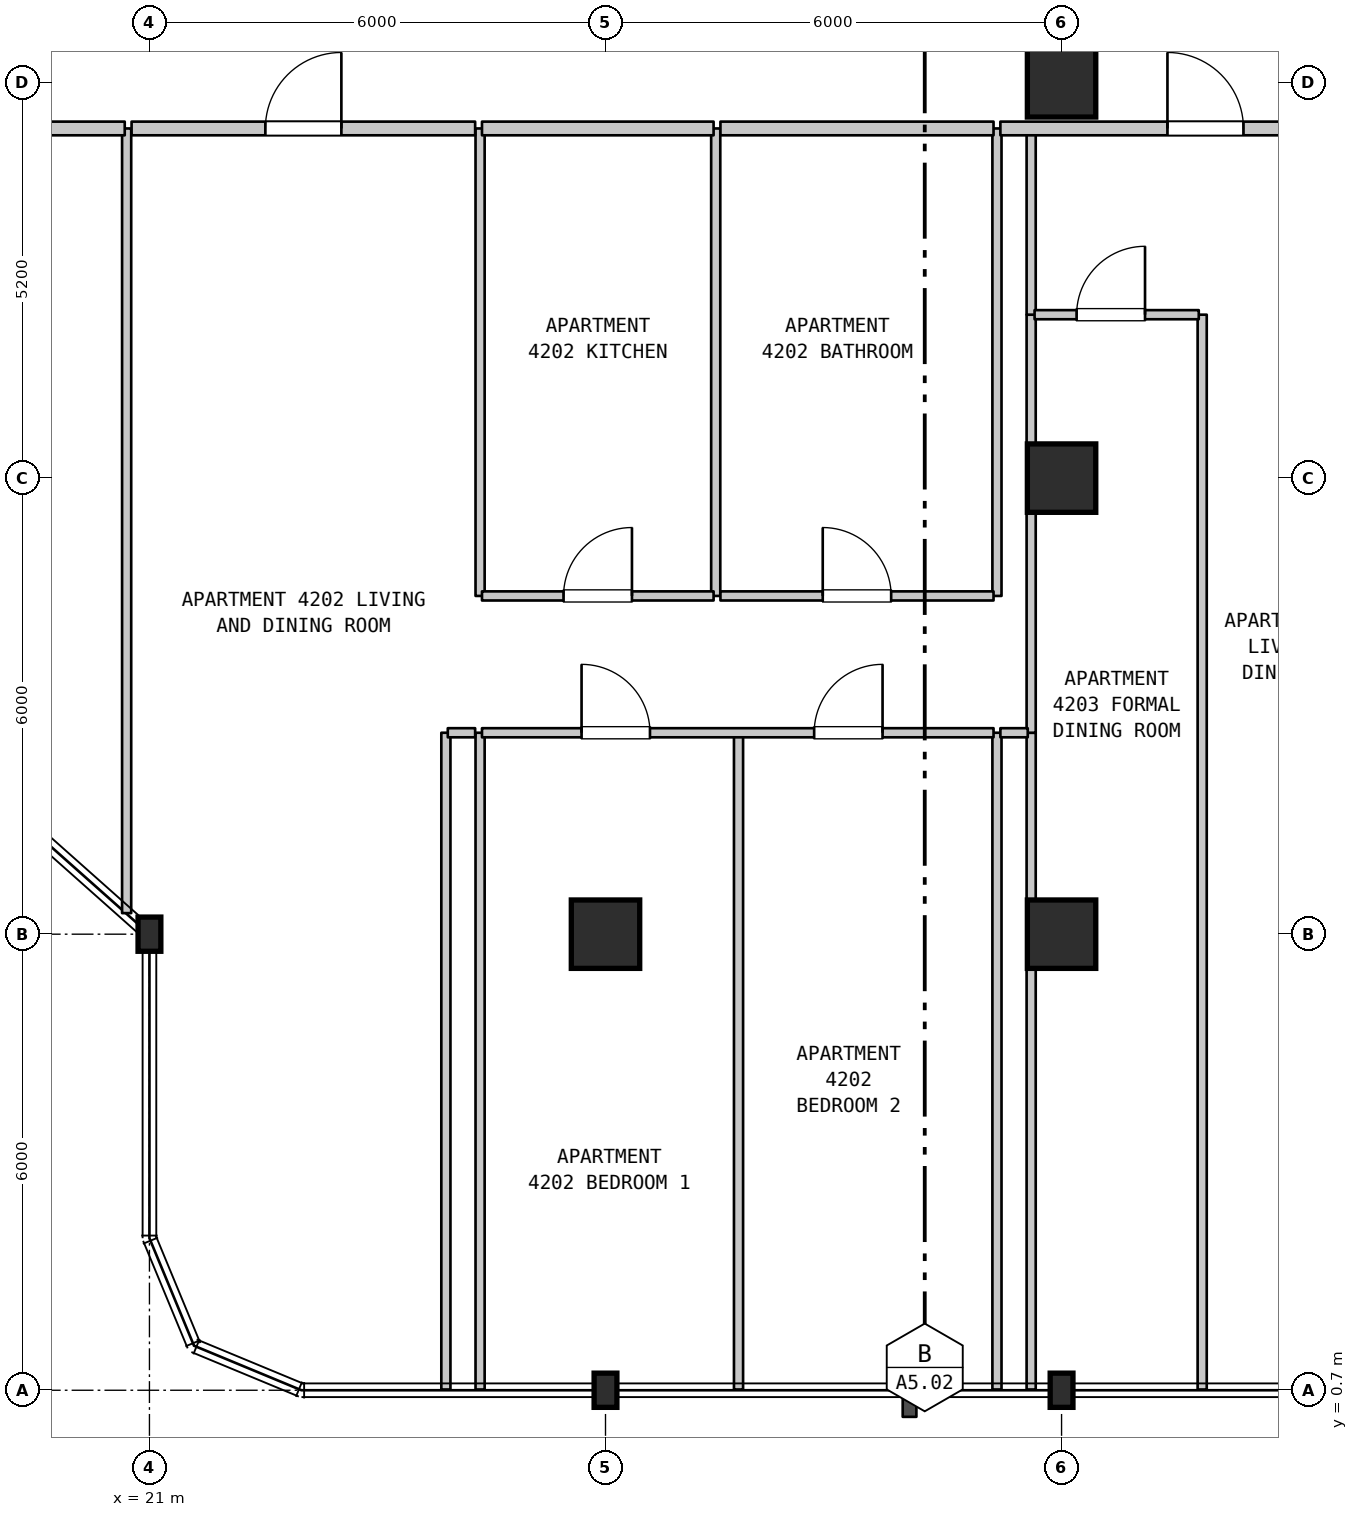
"""IFC4 building model, lengths in metres.
Left out: names, types, materials, properties, quantities, classifications, styles, units other than length and angle.
Written with IfcOpenShell. Run it as: python <this file> out.ifc"""

import sys

from ifc_helpers import new_model, si_unit, direction, frame, frame_2d, origin, origin_2d, place, context, subcontext, project, spatial, rectangle, i_section, extrude, element, fill, save


model = new_model("IFC4")
c1 = context("Model", 3, precision=1e-05, world=origin(), true_north=direction((0.0, 1.0)))
c2 = subcontext(c1, "Body", "Model", "MODEL_VIEW")
j1 = project(units=[si_unit("LENGTHUNIT", "METRE"), si_unit("PLANEANGLEUNIT", "RADIAN")], contexts=[c1])
p1 = place(None, origin())
s1 = spatial("IfcSite", under=j1, at=p1, CompositionType="ELEMENT")
p2 = place(p1, origin())
s2 = spatial("IfcBuilding", under=s1, at=p2, CompositionType="ELEMENT")
p3 = place(p2, frame((0.0, 0.0, 172.8)))
s3 = spatial("IfcBuildingStorey", under=s2, at=p3, CompositionType="ELEMENT", Elevation=172.8)
for number, where, z_axis, x_axis in (
    (1, (21.0, 6.7, 0.0), (0.0, 0.0, 1.0), (1.0, 0.0, 0.0)),
    (2, (27.0, 0.7, 0.0), (0.0, 0.0, 1.0), (1.0, 0.0, 0.0)),
):
    element("IfcColumn", number, at=place(p3, frame(where, z_axis=z_axis, x_axis=x_axis)), inside=s3, PredefinedType="COLUMN", context=c2, shape_type="SweptSolid", body=[
        extrude(i_section(OverallWidth=0.3, OverallDepth=0.45, WebThickness=0.014, FlangeThickness=0.026, FilletRadius=0.027, at=origin_2d()), origin(), (0.0, 0.0, 1.0), 3.7),
    ])
p4 = place(p3, frame((27.0, 6.7, 0.0), z_axis=(0.0, 0.0, 1.0), x_axis=(1.0, 0.0, 0.0)))
e3 = element("IfcColumn", 3, at=p4, inside=s3, PredefinedType="COLUMN", context=c2, shape_type="SweptSolid", body=[
    extrude(rectangle(XDim=0.9, YDim=0.9, at=origin_2d()), origin(), (0.0, 0.0, 1.0), 3.7),
])
p5 = place(p3, frame((33.0, 0.7, 0.0), z_axis=(0.0, 0.0, 1.0), x_axis=(1.0, 0.0, 0.0)))
e4 = element("IfcColumn", 4, at=p5, inside=s3, PredefinedType="COLUMN", context=c2, shape_type="SweptSolid", body=[
    extrude(i_section(OverallWidth=0.3, OverallDepth=0.45, WebThickness=0.014, FlangeThickness=0.026, FilletRadius=0.027, at=origin_2d()), origin(), (0.0, 0.0, 1.0), 3.7),
])
for number, where, z_axis, x_axis in (
    (5, (33.0, 6.7, 0.0), (0.0, 0.0, 1.0), (1.0, 0.0, 0.0)),
    (6, (33.0, 12.7, 0.0), (0.0, 0.0, 1.0), (1.0, 0.0, 0.0)),
    (7, (33.0, 17.9, 0.0), (0.0, 0.0, 1.0), (1.0, 0.0, 0.0)),
):
    element("IfcColumn", number, at=place(p3, frame(where, z_axis=z_axis, x_axis=x_axis)), inside=s3, PredefinedType="COLUMN", context=c2, shape_type="SweptSolid", body=[
        extrude(rectangle(XDim=0.9, YDim=0.9, at=origin_2d()), origin(), (0.0, 0.0, 1.0), 3.7),
    ])
p6 = place(p3, frame((20.7, 6.977, 0.0), z_axis=(0.0, 0.0, 1.0), x_axis=(0.0, 1.0, 0.0)))
e8 = element("IfcWall", 8, at=p6, inside=s3, PredefinedType="PARTITIONING", context=c2, shape_type="SweptSolid", body=[
    extrude(rectangle(XDim=10.323, YDim=0.12, at=frame_2d((5.162, 0.0))), origin(), (0.0, 0.0, 1.0), 3.39),
])
for number, where, z_axis, x_axis in (
    (9, (24.9, 0.71, 0.0), (0.0, 0.0, 1.0), (0.0, 1.0, 0.0)),
    (10, (25.35, 0.71, 0.0), (0.0, 0.0, 1.0), (0.0, 1.0, 0.0)),
):
    element("IfcWall", number, at=place(p3, frame(where, z_axis=z_axis, x_axis=x_axis)), inside=s3, PredefinedType="PARTITIONING", context=c2, shape_type="SweptSolid", body=[
        extrude(rectangle(XDim=8.64, YDim=0.12, at=frame_2d((4.32, 0.0))), origin(), (0.0, 0.0, 1.0), 3.39),
    ])
for number, where, z_axis, x_axis in (
    (11, (25.35, 11.15, 0.0), (0.0, 0.0, 1.0), (0.0, 1.0, 0.0)),
    (12, (28.45, 11.15, 0.0), (0.0, 0.0, 1.0), (0.0, 1.0, 0.0)),
):
    element("IfcWall", number, at=place(p3, frame(where, z_axis=z_axis, x_axis=x_axis)), inside=s3, PredefinedType="PARTITIONING", context=c2, shape_type="SweptSolid", body=[
        extrude(rectangle(XDim=6.15, YDim=0.12, at=frame_2d((3.075, 0.0))), origin(), (0.0, 0.0, 1.0), 3.39),
    ])
for number, where, z_axis, x_axis in (
    (13, (28.75, 0.71, 0.0), (0.0, 0.0, 1.0), (0.0, 1.0, 0.0)),
    (14, (32.15, 0.71, 0.0), (0.0, 0.0, 1.0), (0.0, 1.0, 0.0)),
):
    element("IfcWall", number, at=place(p3, frame(where, z_axis=z_axis, x_axis=x_axis)), inside=s3, PredefinedType="PARTITIONING", context=c2, shape_type="SweptSolid", body=[
        extrude(rectangle(XDim=8.64, YDim=0.12, at=frame_2d((4.32, 0.0))), origin(), (0.0, 0.0, 1.0), 3.39),
    ])
p7 = place(p3, frame((32.15, 11.15, 0.0), z_axis=(0.0, 0.0, 1.0), x_axis=(0.0, 1.0, 0.0)))
e15 = element("IfcWall", 15, at=p7, inside=s3, PredefinedType="PARTITIONING", context=c2, shape_type="SweptSolid", body=[
    extrude(rectangle(XDim=6.15, YDim=0.12, at=frame_2d((3.075, 0.0))), origin(), (0.0, 0.0, 1.0), 3.39),
])
p8 = place(p3, frame((32.6, 0.71, 0.0), z_axis=(0.0, 0.0, 1.0), x_axis=(0.0, 1.0, 0.0)))
e16 = element("IfcWall", 16, at=p8, inside=s3, PredefinedType="PARTITIONING", context=c2, shape_type="SweptSolid", body=[
    extrude(rectangle(XDim=8.64, YDim=0.12, at=frame_2d((4.32, 0.0))), origin(), (0.0, 0.0, 1.0), 3.39),
])
p9 = place(p3, frame((32.6, 9.35, 0.0), z_axis=(0.0, 0.0, 1.0), x_axis=(0.0, 1.0, 0.0)))
e17 = element("IfcWall", 17, at=p9, inside=s3, PredefinedType="PARTITIONING", context=c2, shape_type="SweptSolid", body=[
    extrude(rectangle(XDim=5.5, YDim=0.12, at=frame_2d((2.75, 0.0))), origin(), (0.0, 0.0, 1.0), 3.39),
])
p10 = place(p3, frame((32.6, 14.85, 0.0), z_axis=(0.0, 0.0, 1.0), x_axis=(0.0, 1.0, 0.0)))
e18 = element("IfcWall", 18, at=p10, inside=s3, PredefinedType="PARTITIONING", context=c2, shape_type="SweptSolid", body=[
    extrude(rectangle(XDim=2.45, YDim=0.12, at=frame_2d((1.225, 0.0))), origin(), (0.0, 0.0, 1.0), 3.39),
])
p11 = place(p3, frame((34.85, 0.71, 0.0), z_axis=(0.0, 0.0, 1.0), x_axis=(0.0, 1.0, 0.0)))
e19 = element("IfcWall", 19, at=p11, inside=s3, PredefinedType="PARTITIONING", context=c2, shape_type="SweptSolid", body=[
    extrude(rectangle(XDim=14.14, YDim=0.12, at=frame_2d((7.07, 0.0))), origin(), (0.0, 0.0, 1.0), 3.39),
])
p12 = place(p3, frame((24.925, 9.35, 0.0), z_axis=(0.0, 0.0, 1.0), x_axis=(1.0, 0.0, 0.0)))
e20 = element("IfcWall", 20, at=p12, inside=s3, PredefinedType="PARTITIONING", context=c2, shape_type="SweptSolid", body=[
    extrude(rectangle(XDim=0.36, YDim=0.12, at=frame_2d((0.18, 0.0))), origin(), (0.0, 0.0, 1.0), 3.39),
])
p13 = place(p3, frame((25.375, 9.35, 0.0), z_axis=(0.0, 0.0, 1.0), x_axis=(1.0, 0.0, 0.0)))
e21 = element("IfcWall", 21, at=p13, inside=s3, PredefinedType="PARTITIONING", context=c2, shape_type="SweptSolid", body=[
    extrude(rectangle(XDim=6.73, YDim=0.12, at=frame_2d((3.365, 0.0))), origin(), (0.0, 0.0, 1.0), 3.39),
])
p14 = place(p13, frame((1.31, 0.0, 0.0)))
e22 = element("IfcOpeningElement", 22, at=p14, cuts=e21, PredefinedType="OPENING", context=c2, shape_type="SweptSolid", body=[
    extrude(rectangle(XDim=0.9, YDim=2.15, at=frame_2d((0.45, 1.075))), frame((0.0, 0.07, 0.0), z_axis=(0.0, -1.0, 0.0), x_axis=(1.0, 0.0, 0.0)), (0.0, 0.0, 1.0), 0.14),
])
p15 = place(p13, frame((4.37, 0.0, 0.0)))
e23 = element("IfcOpeningElement", 23, at=p15, cuts=e21, PredefinedType="OPENING", context=c2, shape_type="SweptSolid", body=[
    extrude(rectangle(XDim=0.9, YDim=2.15, at=frame_2d((0.45, 1.075))), frame((0.0, 0.07, 0.0), z_axis=(0.0, -1.0, 0.0), x_axis=(1.0, 0.0, 0.0)), (0.0, 0.0, 1.0), 0.14),
])
p16 = place(p3, frame((32.195, 9.35, 0.0), z_axis=(0.0, 0.0, 1.0), x_axis=(1.0, 0.0, 0.0)))
e24 = element("IfcWall", 24, at=p16, inside=s3, PredefinedType="PARTITIONING", context=c2, shape_type="SweptSolid", body=[
    extrude(rectangle(XDim=0.36, YDim=0.12, at=frame_2d((0.18, 0.0))), origin(), (0.0, 0.0, 1.0), 3.39),
])
p17 = place(p3, frame((25.375, 11.15, 0.0), z_axis=(0.0, 0.0, 1.0), x_axis=(1.0, 0.0, 0.0)))
e25 = element("IfcWall", 25, at=p17, inside=s3, PredefinedType="PARTITIONING", context=c2, shape_type="SweptSolid", body=[
    extrude(rectangle(XDim=3.047, YDim=0.12, at=frame_2d((1.523, 0.0))), origin(), (0.0, 0.0, 1.0), 3.39),
])
p18 = place(p17, frame((1.073, 0.0, 0.0)))
e26 = element("IfcOpeningElement", 26, at=p18, cuts=e25, PredefinedType="OPENING", context=c2, shape_type="SweptSolid", body=[
    extrude(rectangle(XDim=0.9, YDim=2.15, at=frame_2d((0.45, 1.075))), frame((0.0, 0.07, 0.0), z_axis=(0.0, -1.0, 0.0), x_axis=(1.0, 0.0, 0.0)), (0.0, 0.0, 1.0), 0.14),
])
p19 = place(p3, frame((28.512, 11.15, 0.0), z_axis=(0.0, 0.0, 1.0), x_axis=(1.0, 0.0, 0.0)))
e27 = element("IfcWall", 27, at=p19, inside=s3, PredefinedType="PARTITIONING", context=c2, shape_type="SweptSolid", body=[
    extrude(rectangle(XDim=3.593, YDim=0.12, at=frame_2d((1.796, 0.0))), origin(), (0.0, 0.0, 1.0), 3.39),
])
p20 = place(p19, frame((1.346, 0.0, 0.0)))
e28 = element("IfcOpeningElement", 28, at=p20, cuts=e27, PredefinedType="OPENING", context=c2, shape_type="SweptSolid", body=[
    extrude(rectangle(XDim=0.9, YDim=2.1, at=frame_2d((0.45, 1.05))), frame((0.0, 0.07, 0.0), z_axis=(0.0, -1.0, 0.0), x_axis=(1.0, 0.0, 0.0)), (0.0, 0.0, 1.0), 0.14),
])
p21 = place(p3, frame((32.645, 14.85, 0.0), z_axis=(0.0, 0.0, 1.0), x_axis=(1.0, 0.0, 0.0)))
e29 = element("IfcWall", 29, at=p21, inside=s3, PredefinedType="PARTITIONING", context=c2, shape_type="SweptSolid", body=[
    extrude(rectangle(XDim=2.16, YDim=0.12, at=frame_2d((1.08, 0.0))), origin(), (0.0, 0.0, 1.0), 3.39),
])
p22 = place(p21, frame((0.553, 0.0, 0.0)))
e30 = element("IfcOpeningElement", 30, at=p22, cuts=e29, PredefinedType="OPENING", context=c2, shape_type="SweptSolid", body=[
    extrude(rectangle(XDim=0.9, YDim=2.15, at=frame_2d((0.45, 1.075))), frame((0.0, 0.07, 0.0), z_axis=(0.0, -1.0, 0.0), x_axis=(1.0, 0.0, 0.0)), (0.0, 0.0, 1.0), 0.14),
])
p23 = place(p3, frame((18.815, 17.3, 0.0), z_axis=(0.0, 0.0, 1.0), x_axis=(1.0, 0.0, 0.0)))
e31 = element("IfcWall", 31, at=p23, inside=s3, PredefinedType="STANDARD", context=c2, shape_type="SweptSolid", body=[
    extrude(rectangle(XDim=1.86, YDim=0.18, at=frame_2d((0.93, 0.0))), origin(), (0.0, 0.0, 1.0), 3.39),
])
p24 = place(p3, frame((20.765, 17.3, 0.0), z_axis=(0.0, 0.0, 1.0), x_axis=(1.0, 0.0, 0.0)))
e32 = element("IfcWall", 32, at=p24, inside=s3, PredefinedType="STANDARD", context=c2, shape_type="SweptSolid", body=[
    extrude(rectangle(XDim=4.52, YDim=0.18, at=frame_2d((2.26, 0.0))), origin(), (0.0, 0.0, 1.0), 3.39),
])
p25 = place(p24, frame((1.76, 0.0, 0.0)))
e33 = element("IfcOpeningElement", 33, at=p25, cuts=e32, PredefinedType="OPENING", context=c2, shape_type="SweptSolid", body=[
    extrude(rectangle(XDim=1.0, YDim=2.15, at=frame_2d((0.5, 1.075))), frame((0.0, 0.1, 0.0), z_axis=(0.0, -1.0, 0.0), x_axis=(1.0, 0.0, 0.0)), (0.0, 0.0, 1.0), 0.2),
])
p26 = place(p3, frame((25.375, 17.3, 0.0), z_axis=(0.0, 0.0, 1.0), x_axis=(1.0, 0.0, 0.0)))
e34 = element("IfcWall", 34, at=p26, inside=s3, PredefinedType="STANDARD", context=c2, shape_type="SweptSolid", body=[
    extrude(rectangle(XDim=3.047, YDim=0.18, at=frame_2d((1.523, 0.0))), origin(), (0.0, 0.0, 1.0), 3.39),
])
p27 = place(p3, frame((28.512, 17.3, 0.0), z_axis=(0.0, 0.0, 1.0), x_axis=(1.0, 0.0, 0.0)))
e35 = element("IfcWall", 35, at=p27, inside=s3, PredefinedType="STANDARD", context=c2, shape_type="SweptSolid", body=[
    extrude(rectangle(XDim=3.593, YDim=0.18, at=frame_2d((1.796, 0.0))), origin(), (0.0, 0.0, 1.0), 3.39),
])
p28 = place(p3, frame((32.195, 17.3, 0.0), z_axis=(0.0, 0.0, 1.0), x_axis=(1.0, 0.0, 0.0)))
e36 = element("IfcWall", 36, at=p28, inside=s3, PredefinedType="STANDARD", context=c2, shape_type="SweptSolid", body=[
    extrude(rectangle(XDim=5.14, YDim=0.18, at=frame_2d((2.57, 0.0))), origin(), (0.0, 0.0, 1.0), 3.39),
])
p29 = place(p28, frame((2.198, 0.0, 0.0)))
e37 = element("IfcOpeningElement", 37, at=p29, cuts=e36, PredefinedType="OPENING", context=c2, shape_type="SweptSolid", body=[
    extrude(rectangle(XDim=1.0, YDim=2.15, at=frame_2d((0.5, 1.075))), frame((0.0, 0.1, 0.0), z_axis=(0.0, -1.0, 0.0), x_axis=(1.0, 0.0, 0.0)), (0.0, 0.0, 1.0), 0.2),
])
p30 = place(p14, origin())
e38 = element("IfcDoor", 38, at=p30, inside=s3, OperationType="SINGLE_SWING_LEFT", PredefinedType="DOOR", context=c2, shape_type="SweptSolid", body=[
    extrude(rectangle(XDim=0.9, YDim=2.15, at=frame_2d((0.45, 1.075))), frame((0.0, 0.025, 0.0), z_axis=(0.0, -1.0, 0.0), x_axis=(1.0, 0.0, 0.0)), (0.0, 0.0, 1.0), 0.05),
])
fill(e22, e38)
p31 = place(p15, origin())
e39 = element("IfcDoor", 39, at=p31, inside=s3, OperationType="SINGLE_SWING_RIGHT", PredefinedType="DOOR", context=c2, shape_type="SweptSolid", body=[
    extrude(rectangle(XDim=0.9, YDim=2.15, at=frame_2d((0.45, 1.075))), frame((0.0, 0.025, 0.0), z_axis=(0.0, -1.0, 0.0), x_axis=(1.0, 0.0, 0.0)), (0.0, 0.0, 1.0), 0.05),
])
fill(e23, e39)
p32 = place(p18, origin())
e40 = element("IfcDoor", 40, at=p32, inside=s3, OperationType="SINGLE_SWING_RIGHT", PredefinedType="DOOR", context=c2, shape_type="SweptSolid", body=[
    extrude(rectangle(XDim=0.9, YDim=2.15, at=frame_2d((0.45, 1.075))), frame((0.0, 0.025, 0.0), z_axis=(0.0, -1.0, 0.0), x_axis=(1.0, 0.0, 0.0)), (0.0, 0.0, 1.0), 0.05),
])
fill(e26, e40)
p33 = place(p20, origin())
e41 = element("IfcDoor", 41, at=p33, inside=s3, OperationType="SINGLE_SWING_LEFT", PredefinedType="DOOR", context=c2, shape_type="SweptSolid", body=[
    extrude(rectangle(XDim=0.9, YDim=2.1, at=frame_2d((0.45, 1.05))), frame((0.0, 0.025, 0.0), z_axis=(0.0, -1.0, 0.0), x_axis=(1.0, 0.0, 0.0)), (0.0, 0.0, 1.0), 0.05),
])
fill(e28, e41)
p34 = place(p22, origin())
e42 = element("IfcDoor", 42, at=p34, inside=s3, OperationType="SINGLE_SWING_RIGHT", PredefinedType="DOOR", context=c2, shape_type="SweptSolid", body=[
    extrude(rectangle(XDim=0.9, YDim=2.15, at=frame_2d((0.45, 1.075))), frame((0.0, 0.025, 0.0), z_axis=(0.0, -1.0, 0.0), x_axis=(1.0, 0.0, 0.0)), (0.0, 0.0, 1.0), 0.05),
])
fill(e30, e42)
p35 = place(p25, origin())
e43 = element("IfcDoor", 43, at=p35, inside=s3, OperationType="SINGLE_SWING_RIGHT", PredefinedType="DOOR", context=c2, shape_type="SweptSolid", body=[
    extrude(rectangle(XDim=1.0, YDim=2.15, at=frame_2d((0.5, 1.075))), frame((0.0, 0.025, 0.0), z_axis=(0.0, -1.0, 0.0), x_axis=(1.0, 0.0, 0.0)), (0.0, 0.0, 1.0), 0.05),
])
fill(e33, e43)
p36 = place(p29, origin())
e44 = element("IfcDoor", 44, at=p36, inside=s3, OperationType="SINGLE_SWING_LEFT", PredefinedType="DOOR", context=c2, shape_type="SweptSolid", body=[
    extrude(rectangle(XDim=1.0, YDim=2.15, at=frame_2d((0.5, 1.075))), frame((0.0, 0.025, 0.0), z_axis=(0.0, -1.0, 0.0), x_axis=(1.0, 0.0, 0.0)), (0.0, 0.0, 1.0), 0.05),
])
fill(e37, e44)
save(model, sys.argv[1])
